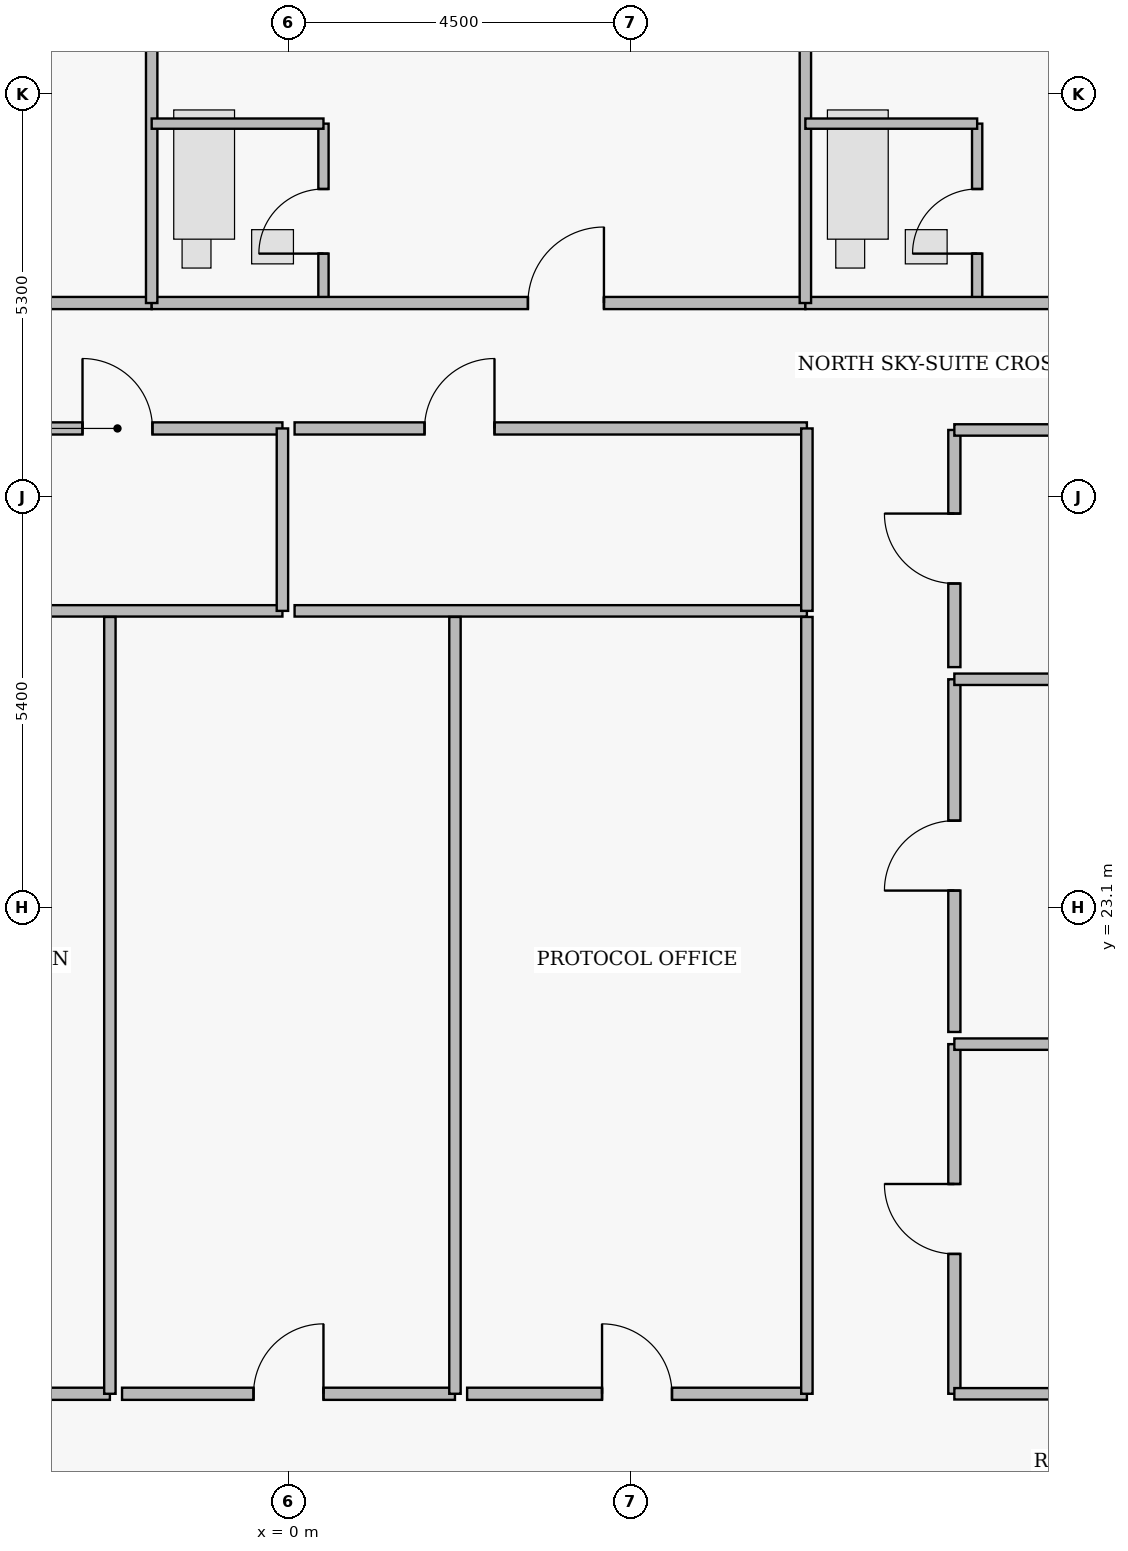
"""IFC4 building model, lengths in metres.
Left out: names, types, materials, properties, quantities, classifications, styles, units other than length and angle.
Written with IfcOpenShell. Run it as: python <this file> out.ifc"""

import sys

from ifc_helpers import new_model, si_unit, direction, frame, frame_2d, origin, place, context, subcontext, project, spatial, rectangle, extrude, element, fill, save


model = new_model("IFC4")
c1 = context("Model", 3, precision=1e-05, world=origin(), true_north=direction((0.0, 1.0)))
c2 = subcontext(c1, "Body", "Model", "MODEL_VIEW")
j1 = project(units=[si_unit("LENGTHUNIT", "METRE"), si_unit("PLANEANGLEUNIT", "RADIAN")], contexts=[c1])
p1 = place(None, origin())
s1 = spatial("IfcSite", under=j1, at=p1, CompositionType="ELEMENT")
p2 = place(p1, origin())
s2 = spatial("IfcBuilding", under=s1, at=p2, CompositionType="ELEMENT")
p3 = place(p2, frame((0.0, 0.0, 280.35)))
s3 = spatial("IfcBuildingStorey", under=s2, at=p3, CompositionType="ELEMENT", Elevation=280.35)
p4 = place(p3, frame((-9.4, 31.05, 0.0), z_axis=(0.0, 0.0, 1.0), x_axis=(1.0, 0.0, 0.0)))
e1 = element("IfcWall", 1, at=p4, inside=s3, PredefinedType="PARTITIONING", context=c2, shape_type="SweptSolid", body=[
    extrude(rectangle(XDim=7.6, YDim=0.16, at=frame_2d((3.8, 0.0))), origin(), (0.0, 0.0, 1.0), 3.48),
])
p5 = place(p4, frame((4.45, 0.0, 0.0)))
e2 = element("IfcOpeningElement", 2, at=p5, cuts=e1, PredefinedType="OPENING", context=c2, shape_type="SweptSolid", body=[
    extrude(rectangle(XDim=1.0, YDim=2.15, at=frame_2d((0.5, 1.075))), frame((0.0, 0.09, 0.0), z_axis=(0.0, -1.0, 0.0), x_axis=(1.0, 0.0, 0.0)), (0.0, 0.0, 1.0), 0.18),
])
p6 = place(p3, frame((0.46, 31.05, 0.0), z_axis=(0.0, 0.0, 1.0), x_axis=(0.0, 1.0, 0.0)))
e3 = element("IfcWall", 3, at=p6, inside=s3, PredefinedType="PLUMBINGWALL", context=c2, shape_type="SweptSolid", body=[
    extrude(rectangle(XDim=2.36, YDim=0.135, at=frame_2d((1.18, 0.0))), origin(), (0.0, 0.0, 1.0), 3.48),
])
p7 = place(p6, frame((0.65, 0.0, 0.0)))
e4 = element("IfcOpeningElement", 4, at=p7, cuts=e3, PredefinedType="OPENING", context=c2, shape_type="SweptSolid", body=[
    extrude(rectangle(XDim=0.85, YDim=2.1, at=frame_2d((0.425, 1.05))), frame((0.0, 0.077, 0.0), z_axis=(0.0, -1.0, 0.0), x_axis=(1.0, 0.0, 0.0)), (0.0, 0.0, 1.0), 0.155),
])
p8 = place(p3, frame((-1.8, 31.05, 0.0), z_axis=(0.0, 0.0, 1.0), x_axis=(1.0, 0.0, 0.0)))
e5 = element("IfcWall", 5, at=p8, inside=s3, PredefinedType="PARTITIONING", context=c2, shape_type="SweptSolid", body=[
    extrude(rectangle(XDim=8.6, YDim=0.16, at=frame_2d((4.3, 0.0))), origin(), (0.0, 0.0, 1.0), 3.48),
])
p9 = place(p8, frame((4.95, 0.0, 0.0)))
e6 = element("IfcOpeningElement", 6, at=p9, cuts=e5, PredefinedType="OPENING", context=c2, shape_type="SweptSolid", body=[
    extrude(rectangle(XDim=1.0, YDim=2.15, at=frame_2d((0.5, 1.075))), frame((0.0, 0.09, 0.0), z_axis=(0.0, -1.0, 0.0), x_axis=(1.0, 0.0, 0.0)), (0.0, 0.0, 1.0), 0.18),
])
p10 = place(p3, frame((9.06, 31.05, 0.0), z_axis=(0.0, 0.0, 1.0), x_axis=(0.0, 1.0, 0.0)))
e7 = element("IfcWall", 7, at=p10, inside=s3, PredefinedType="PLUMBINGWALL", context=c2, shape_type="SweptSolid", body=[
    extrude(rectangle(XDim=2.36, YDim=0.135, at=frame_2d((1.18, 0.0))), origin(), (0.0, 0.0, 1.0), 3.48),
])
p11 = place(p10, frame((0.65, 0.0, 0.0)))
e8 = element("IfcOpeningElement", 8, at=p11, cuts=e7, PredefinedType="OPENING", context=c2, shape_type="SweptSolid", body=[
    extrude(rectangle(XDim=0.85, YDim=2.1, at=frame_2d((0.425, 1.05))), frame((0.0, 0.077, 0.0), z_axis=(0.0, -1.0, 0.0), x_axis=(1.0, 0.0, 0.0)), (0.0, 0.0, 1.0), 0.155),
])
p12 = place(p3, frame((6.8, 31.05, 0.0), z_axis=(0.0, 0.0, 1.0), x_axis=(1.0, 0.0, 0.0)))
e9 = element("IfcWall", 9, at=p12, inside=s3, PredefinedType="PARTITIONING", context=c2, shape_type="SweptSolid", body=[
    extrude(rectangle(XDim=13.34, YDim=0.16, at=frame_2d((6.67, 0.0))), origin(), (0.0, 0.0, 1.0), 3.48),
])
p13 = place(p12, frame((7.32, 0.0, 0.0)))
e10 = element("IfcOpeningElement", 10, at=p13, cuts=e9, PredefinedType="OPENING", context=c2, shape_type="SweptSolid", body=[
    extrude(rectangle(XDim=1.0, YDim=2.15, at=frame_2d((0.5, 1.075))), frame((0.0, 0.09, 0.0), z_axis=(0.0, -1.0, 0.0), x_axis=(1.0, 0.0, 0.0)), (0.0, 0.0, 1.0), 0.18),
])
p14 = place(p3, frame((-6.82, 29.4, 0.0), z_axis=(0.0, 0.0, 1.0), x_axis=(1.0, 0.0, 0.0)))
e11 = element("IfcWall", 11, at=p14, inside=s3, PredefinedType="PARTITIONING", context=c2, shape_type="SweptSolid", body=[
    extrude(rectangle(XDim=6.74, YDim=0.16, at=frame_2d((3.37, 0.0))), origin(), (0.0, 0.0, 1.0), 3.48),
])
p15 = place(p14, frame((4.11, 0.0, 0.0)))
e12 = element("IfcOpeningElement", 12, at=p15, cuts=e11, PredefinedType="OPENING", context=c2, shape_type="SweptSolid", body=[
    extrude(rectangle(XDim=0.92, YDim=2.12, at=frame_2d((0.46, 1.06))), frame((0.0, 0.09, 0.0), z_axis=(0.0, -1.0, 0.0), x_axis=(1.0, 0.0, 0.0)), (0.0, 0.0, 1.0), 0.18),
])
p16 = place(p3, frame((0.08, 29.4, 0.0), z_axis=(0.0, 0.0, 1.0), x_axis=(1.0, 0.0, 0.0)))
e13 = element("IfcWall", 13, at=p16, inside=s3, PredefinedType="PARTITIONING", context=c2, shape_type="SweptSolid", body=[
    extrude(rectangle(XDim=6.74, YDim=0.16, at=frame_2d((3.37, 0.0))), origin(), (0.0, 0.0, 1.0), 3.48),
])
p17 = place(p16, frame((1.71, 0.0, 0.0)))
e14 = element("IfcOpeningElement", 14, at=p17, cuts=e13, PredefinedType="OPENING", context=c2, shape_type="SweptSolid", body=[
    extrude(rectangle(XDim=0.92, YDim=2.12, at=frame_2d((0.46, 1.06))), frame((0.0, 0.09, 0.0), z_axis=(0.0, -1.0, 0.0), x_axis=(1.0, 0.0, 0.0)), (0.0, 0.0, 1.0), 0.18),
])
p18 = place(p3, frame((-6.82, 16.7, 0.0), z_axis=(0.0, 0.0, 1.0), x_axis=(1.0, 0.0, 0.0)))
e15 = element("IfcWall", 15, at=p18, inside=s3, PredefinedType="PARTITIONING", context=c2, shape_type="SweptSolid", body=[
    extrude(rectangle(XDim=4.47, YDim=0.16, at=frame_2d((2.235, 0.0))), origin(), (0.0, 0.0, 1.0), 3.076),
])
p19 = place(p18, frame((1.775, 0.0, 0.0)))
e16 = element("IfcOpeningElement", 16, at=p19, cuts=e15, PredefinedType="OPENING", context=c2, shape_type="SweptSolid", body=[
    extrude(rectangle(XDim=0.92, YDim=2.12, at=frame_2d((0.46, 1.06))), frame((0.0, 0.09, 0.0), z_axis=(0.0, -1.0, 0.0), x_axis=(1.0, 0.0, 0.0)), (0.0, 0.0, 1.0), 0.18),
])
p20 = place(p3, frame((-2.19, 16.7, 0.0), z_axis=(0.0, 0.0, 1.0), x_axis=(1.0, 0.0, 0.0)))
e17 = element("IfcWall", 17, at=p20, inside=s3, PredefinedType="PARTITIONING", context=c2, shape_type="SweptSolid", body=[
    extrude(rectangle(XDim=4.38, YDim=0.16, at=frame_2d((2.19, 0.0))), origin(), (0.0, 0.0, 1.0), 3.076),
])
p21 = place(p20, frame((1.73, 0.0, 0.0)))
e18 = element("IfcOpeningElement", 18, at=p21, cuts=e17, PredefinedType="OPENING", context=c2, shape_type="SweptSolid", body=[
    extrude(rectangle(XDim=0.92, YDim=2.12, at=frame_2d((0.46, 1.06))), frame((0.0, 0.09, 0.0), z_axis=(0.0, -1.0, 0.0), x_axis=(1.0, 0.0, 0.0)), (0.0, 0.0, 1.0), 0.18),
])
p22 = place(p3, frame((2.35, 16.7, 0.0), z_axis=(0.0, 0.0, 1.0), x_axis=(1.0, 0.0, 0.0)))
e19 = element("IfcWall", 19, at=p22, inside=s3, PredefinedType="PARTITIONING", context=c2, shape_type="SweptSolid", body=[
    extrude(rectangle(XDim=4.47, YDim=0.16, at=frame_2d((2.235, 0.0))), origin(), (0.0, 0.0, 1.0), 3.076),
])
p23 = place(p22, frame((1.775, 0.0, 0.0)))
e20 = element("IfcOpeningElement", 20, at=p23, cuts=e19, PredefinedType="OPENING", context=c2, shape_type="SweptSolid", body=[
    extrude(rectangle(XDim=0.92, YDim=2.12, at=frame_2d((0.46, 1.06))), frame((0.0, 0.09, 0.0), z_axis=(0.0, -1.0, 0.0), x_axis=(1.0, 0.0, 0.0)), (0.0, 0.0, 1.0), 0.18),
])
p24 = place(p3, frame((8.76, 16.7, 0.0), z_axis=(0.0, 0.0, 1.0), x_axis=(0.0, 1.0, 0.0)))
e21 = element("IfcWall", 21, at=p24, inside=s3, PredefinedType="PARTITIONING", context=c2, shape_type="SweptSolid", body=[
    extrude(rectangle(XDim=4.6, YDim=0.16, at=frame_2d((2.3, 0.0))), origin(), (0.0, 0.0, 1.0), 3.48),
])
p25 = place(p24, frame((1.84, 0.0, 0.0)))
e22 = element("IfcOpeningElement", 22, at=p25, cuts=e21, PredefinedType="OPENING", context=c2, shape_type="SweptSolid", body=[
    extrude(rectangle(XDim=0.92, YDim=2.12, at=frame_2d((0.46, 1.06))), frame((0.0, 0.09, 0.0), z_axis=(0.0, -1.0, 0.0), x_axis=(1.0, 0.0, 0.0)), (0.0, 0.0, 1.0), 0.18),
])
p26 = place(p3, frame((8.76, 21.46, 0.0), z_axis=(0.0, 0.0, 1.0), x_axis=(0.0, 1.0, 0.0)))
e23 = element("IfcWall", 23, at=p26, inside=s3, PredefinedType="PARTITIONING", context=c2, shape_type="SweptSolid", body=[
    extrude(rectangle(XDim=4.64, YDim=0.16, at=frame_2d((2.32, 0.0))), origin(), (0.0, 0.0, 1.0), 3.48),
])
p27 = place(p26, frame((1.86, 0.0, 0.0)))
e24 = element("IfcOpeningElement", 24, at=p27, cuts=e23, PredefinedType="OPENING", context=c2, shape_type="SweptSolid", body=[
    extrude(rectangle(XDim=0.92, YDim=2.12, at=frame_2d((0.46, 1.06))), frame((0.0, 0.09, 0.0), z_axis=(0.0, -1.0, 0.0), x_axis=(1.0, 0.0, 0.0)), (0.0, 0.0, 1.0), 0.18),
])
p28 = place(p3, frame((8.76, 26.26, 0.0), z_axis=(0.0, 0.0, 1.0), x_axis=(0.0, 1.0, 0.0)))
e25 = element("IfcWall", 25, at=p28, inside=s3, PredefinedType="PARTITIONING", context=c2, shape_type="SweptSolid", body=[
    extrude(rectangle(XDim=3.12, YDim=0.16, at=frame_2d((1.56, 0.0))), origin(), (0.0, 0.0, 1.0), 3.48),
])
p29 = place(p28, frame((1.1, 0.0, 0.0)))
e26 = element("IfcOpeningElement", 26, at=p29, cuts=e25, PredefinedType="OPENING", context=c2, shape_type="SweptSolid", body=[
    extrude(rectangle(XDim=0.92, YDim=2.12, at=frame_2d((0.46, 1.06))), frame((0.0, 0.09, 0.0), z_axis=(0.0, -1.0, 0.0), x_axis=(1.0, 0.0, 0.0)), (0.0, 0.0, 1.0), 0.18),
])
p30 = place(p3, frame((-1.8, 31.05, 0.0), z_axis=(0.0, 0.0, 1.0), x_axis=(0.0, 1.0, 0.0)))
e27 = element("IfcWall", 27, at=p30, inside=s3, PredefinedType="PARTITIONING", context=c2, shape_type="SweptSolid", body=[
    extrude(rectangle(XDim=7.87, YDim=0.15, at=frame_2d((3.935, 0.0))), origin(), (0.0, 0.0, 1.0), 3.48),
])
p31 = place(p3, frame((-1.8, 33.41, 0.0), z_axis=(0.0, 0.0, 1.0), x_axis=(1.0, 0.0, 0.0)))
e28 = element("IfcWall", 28, at=p31, inside=s3, PredefinedType="PLUMBINGWALL", context=c2, shape_type="SweptSolid", body=[
    extrude(rectangle(XDim=2.26, YDim=0.135, at=frame_2d((1.13, 0.0))), origin(), (0.0, 0.0, 1.0), 3.076),
])
p32 = place(p3, frame((6.8, 31.05, 0.0), z_axis=(0.0, 0.0, 1.0), x_axis=(0.0, 1.0, 0.0)))
e29 = element("IfcWall", 29, at=p32, inside=s3, PredefinedType="PARTITIONING", context=c2, shape_type="SweptSolid", body=[
    extrude(rectangle(XDim=7.87, YDim=0.15, at=frame_2d((3.935, 0.0))), origin(), (0.0, 0.0, 1.0), 3.48),
])
p33 = place(p3, frame((6.8, 33.41, 0.0), z_axis=(0.0, 0.0, 1.0), x_axis=(1.0, 0.0, 0.0)))
e30 = element("IfcWall", 30, at=p33, inside=s3, PredefinedType="PLUMBINGWALL", context=c2, shape_type="SweptSolid", body=[
    extrude(rectangle(XDim=2.26, YDim=0.135, at=frame_2d((1.13, 0.0))), origin(), (0.0, 0.0, 1.0), 3.076),
])
p34 = place(p3, frame((-6.82, 27.0, 0.0), z_axis=(0.0, 0.0, 1.0), x_axis=(1.0, 0.0, 0.0)))
e31 = element("IfcWall", 31, at=p34, inside=s3, PredefinedType="PARTITIONING", context=c2, shape_type="SweptSolid", body=[
    extrude(rectangle(XDim=6.74, YDim=0.15, at=frame_2d((3.37, 0.0))), origin(), (0.0, 0.0, 1.0), 3.48),
])
p35 = place(p3, frame((-0.08, 27.0, 0.0), z_axis=(0.0, 0.0, 1.0), x_axis=(0.0, 1.0, 0.0)))
e32 = element("IfcWall", 32, at=p35, inside=s3, PredefinedType="PARTITIONING", context=c2, shape_type="SweptSolid", body=[
    extrude(rectangle(XDim=2.4, YDim=0.15, at=frame_2d((1.2, 0.0))), origin(), (0.0, 0.0, 1.0), 3.48),
])
p36 = place(p3, frame((0.08, 27.0, 0.0), z_axis=(0.0, 0.0, 1.0), x_axis=(1.0, 0.0, 0.0)))
e33 = element("IfcWall", 33, at=p36, inside=s3, PredefinedType="PARTITIONING", context=c2, shape_type="SweptSolid", body=[
    extrude(rectangle(XDim=6.74, YDim=0.15, at=frame_2d((3.37, 0.0))), origin(), (0.0, 0.0, 1.0), 3.48),
])
p37 = place(p3, frame((6.82, 27.0, 0.0), z_axis=(0.0, 0.0, 1.0), x_axis=(0.0, 1.0, 0.0)))
e34 = element("IfcWall", 34, at=p37, inside=s3, PredefinedType="PARTITIONING", context=c2, shape_type="SweptSolid", body=[
    extrude(rectangle(XDim=2.4, YDim=0.15, at=frame_2d((1.2, 0.0))), origin(), (0.0, 0.0, 1.0), 3.48),
])
for number, where, z_axis, x_axis in (
    (35, (-2.35, 16.7, 0.0), (0.0, 0.0, 1.0), (0.0, 1.0, 0.0)),
    (36, (2.19, 16.7, 0.0), (0.0, 0.0, 1.0), (0.0, 1.0, 0.0)),
    (37, (6.82, 16.7, 0.0), (0.0, 0.0, 1.0), (0.0, 1.0, 0.0)),
):
    element("IfcWall", number, at=place(p3, frame(where, z_axis=z_axis, x_axis=x_axis)), inside=s3, PredefinedType="PARTITIONING", context=c2, shape_type="SweptSolid", body=[
        extrude(rectangle(XDim=10.22, YDim=0.15, at=frame_2d((5.11, 0.0))), origin(), (0.0, 0.0, 1.0), 3.48),
    ])
p38 = place(p3, frame((8.76, 16.7, 0.0), z_axis=(0.0, 0.0, 1.0), x_axis=(1.0, 0.0, 0.0)))
e38 = element("IfcWall", 38, at=p38, inside=s3, PredefinedType="PARTITIONING", context=c2, shape_type="SweptSolid", body=[
    extrude(rectangle(XDim=12.358, YDim=0.15, at=frame_2d((6.179, 0.0))), origin(), (0.0, 0.0, 1.0), 3.076),
])
p39 = place(p3, frame((8.76, 21.3, 0.0), z_axis=(0.0, 0.0, 1.0), x_axis=(1.0, 0.0, 0.0)))
e39 = element("IfcWall", 39, at=p39, inside=s3, PredefinedType="PARTITIONING", context=c2, shape_type="SweptSolid", body=[
    extrude(rectangle(XDim=12.902, YDim=0.15, at=frame_2d((6.451, 0.0))), origin(), (0.0, 0.0, 1.0), 3.48),
])
for number, where, z_axis, x_axis in (
    (40, (8.76, 26.1, 0.0), (0.0, 0.0, 1.0), (1.0, 0.0, 0.0)),
    (41, (8.76, 29.38, 0.0), (0.0, 0.0, 1.0), (1.0, 0.0, 0.0)),
):
    element("IfcWall", number, at=place(p3, frame(where, z_axis=z_axis, x_axis=x_axis)), inside=s3, PredefinedType="PARTITIONING", context=c2, shape_type="SweptSolid", body=[
        extrude(rectangle(XDim=11.38, YDim=0.15, at=frame_2d((5.69, 0.0))), origin(), (0.0, 0.0, 1.0), 3.48),
    ])
p40 = place(p7, origin())
e42 = element("IfcDoor", 42, at=p40, inside=s3, OperationType="SINGLE_SWING_LEFT", PredefinedType="DOOR", context=c2, shape_type="SweptSolid", body=[
    extrude(rectangle(XDim=0.85, YDim=2.1, at=frame_2d((0.425, 1.05))), frame((0.0, 0.025, 0.0), z_axis=(0.0, -1.0, 0.0), x_axis=(1.0, 0.0, 0.0)), (0.0, 0.0, 1.0), 0.05),
])
fill(e4, e42)
p41 = place(p9, origin())
e43 = element("IfcDoor", 43, at=p41, inside=s3, OperationType="SINGLE_SWING_RIGHT", PredefinedType="DOOR", context=c2, shape_type="SweptSolid", body=[
    extrude(rectangle(XDim=1.0, YDim=2.15, at=frame_2d((0.5, 1.075))), frame((0.0, 0.025, 0.0), z_axis=(0.0, -1.0, 0.0), x_axis=(1.0, 0.0, 0.0)), (0.0, 0.0, 1.0), 0.05),
])
fill(e6, e43)
p42 = place(p11, origin())
e44 = element("IfcDoor", 44, at=p42, inside=s3, OperationType="SINGLE_SWING_LEFT", PredefinedType="DOOR", context=c2, shape_type="SweptSolid", body=[
    extrude(rectangle(XDim=0.85, YDim=2.1, at=frame_2d((0.425, 1.05))), frame((0.0, 0.025, 0.0), z_axis=(0.0, -1.0, 0.0), x_axis=(1.0, 0.0, 0.0)), (0.0, 0.0, 1.0), 0.05),
])
fill(e8, e44)
p43 = place(p15, origin())
e45 = element("IfcDoor", 45, at=p43, inside=s3, OperationType="SINGLE_SWING_LEFT", PredefinedType="DOOR", context=c2, shape_type="SweptSolid", body=[
    extrude(rectangle(XDim=0.92, YDim=2.12, at=frame_2d((0.46, 1.06))), frame((0.0, 0.025, 0.0), z_axis=(0.0, -1.0, 0.0), x_axis=(1.0, 0.0, 0.0)), (0.0, 0.0, 1.0), 0.05),
])
fill(e12, e45)
p44 = place(p17, origin())
e46 = element("IfcDoor", 46, at=p44, inside=s3, OperationType="SINGLE_SWING_RIGHT", PredefinedType="DOOR", context=c2, shape_type="SweptSolid", body=[
    extrude(rectangle(XDim=0.92, YDim=2.12, at=frame_2d((0.46, 1.06))), frame((0.0, 0.025, 0.0), z_axis=(0.0, -1.0, 0.0), x_axis=(1.0, 0.0, 0.0)), (0.0, 0.0, 1.0), 0.05),
])
fill(e14, e46)
p45 = place(p21, origin())
e47 = element("IfcDoor", 47, at=p45, inside=s3, OperationType="SINGLE_SWING_RIGHT", PredefinedType="DOOR", context=c2, shape_type="SweptSolid", body=[
    extrude(rectangle(XDim=0.92, YDim=2.12, at=frame_2d((0.46, 1.06))), frame((0.0, 0.025, 0.0), z_axis=(0.0, -1.0, 0.0), x_axis=(1.0, 0.0, 0.0)), (0.0, 0.0, 1.0), 0.05),
])
fill(e18, e47)
p46 = place(p23, origin())
e48 = element("IfcDoor", 48, at=p46, inside=s3, OperationType="SINGLE_SWING_LEFT", PredefinedType="DOOR", context=c2, shape_type="SweptSolid", body=[
    extrude(rectangle(XDim=0.92, YDim=2.12, at=frame_2d((0.46, 1.06))), frame((0.0, 0.025, 0.0), z_axis=(0.0, -1.0, 0.0), x_axis=(1.0, 0.0, 0.0)), (0.0, 0.0, 1.0), 0.05),
])
fill(e20, e48)
p47 = place(p25, origin())
e49 = element("IfcDoor", 49, at=p47, inside=s3, OperationType="SINGLE_SWING_RIGHT", PredefinedType="DOOR", context=c2, shape_type="SweptSolid", body=[
    extrude(rectangle(XDim=0.92, YDim=2.12, at=frame_2d((0.46, 1.06))), frame((0.0, 0.025, 0.0), z_axis=(0.0, -1.0, 0.0), x_axis=(1.0, 0.0, 0.0)), (0.0, 0.0, 1.0), 0.05),
])
fill(e22, e49)
p48 = place(p27, origin())
e50 = element("IfcDoor", 50, at=p48, inside=s3, OperationType="SINGLE_SWING_LEFT", PredefinedType="DOOR", context=c2, shape_type="SweptSolid", body=[
    extrude(rectangle(XDim=0.92, YDim=2.12, at=frame_2d((0.46, 1.06))), frame((0.0, 0.025, 0.0), z_axis=(0.0, -1.0, 0.0), x_axis=(1.0, 0.0, 0.0)), (0.0, 0.0, 1.0), 0.05),
])
fill(e24, e50)
p49 = place(p29, origin())
e51 = element("IfcDoor", 51, at=p49, inside=s3, OperationType="SINGLE_SWING_RIGHT", PredefinedType="DOOR", context=c2, shape_type="SweptSolid", body=[
    extrude(rectangle(XDim=0.92, YDim=2.12, at=frame_2d((0.46, 1.06))), frame((0.0, 0.025, 0.0), z_axis=(0.0, -1.0, 0.0), x_axis=(1.0, 0.0, 0.0)), (0.0, 0.0, 1.0), 0.05),
])
fill(e26, e51)
save(model, sys.argv[1])
